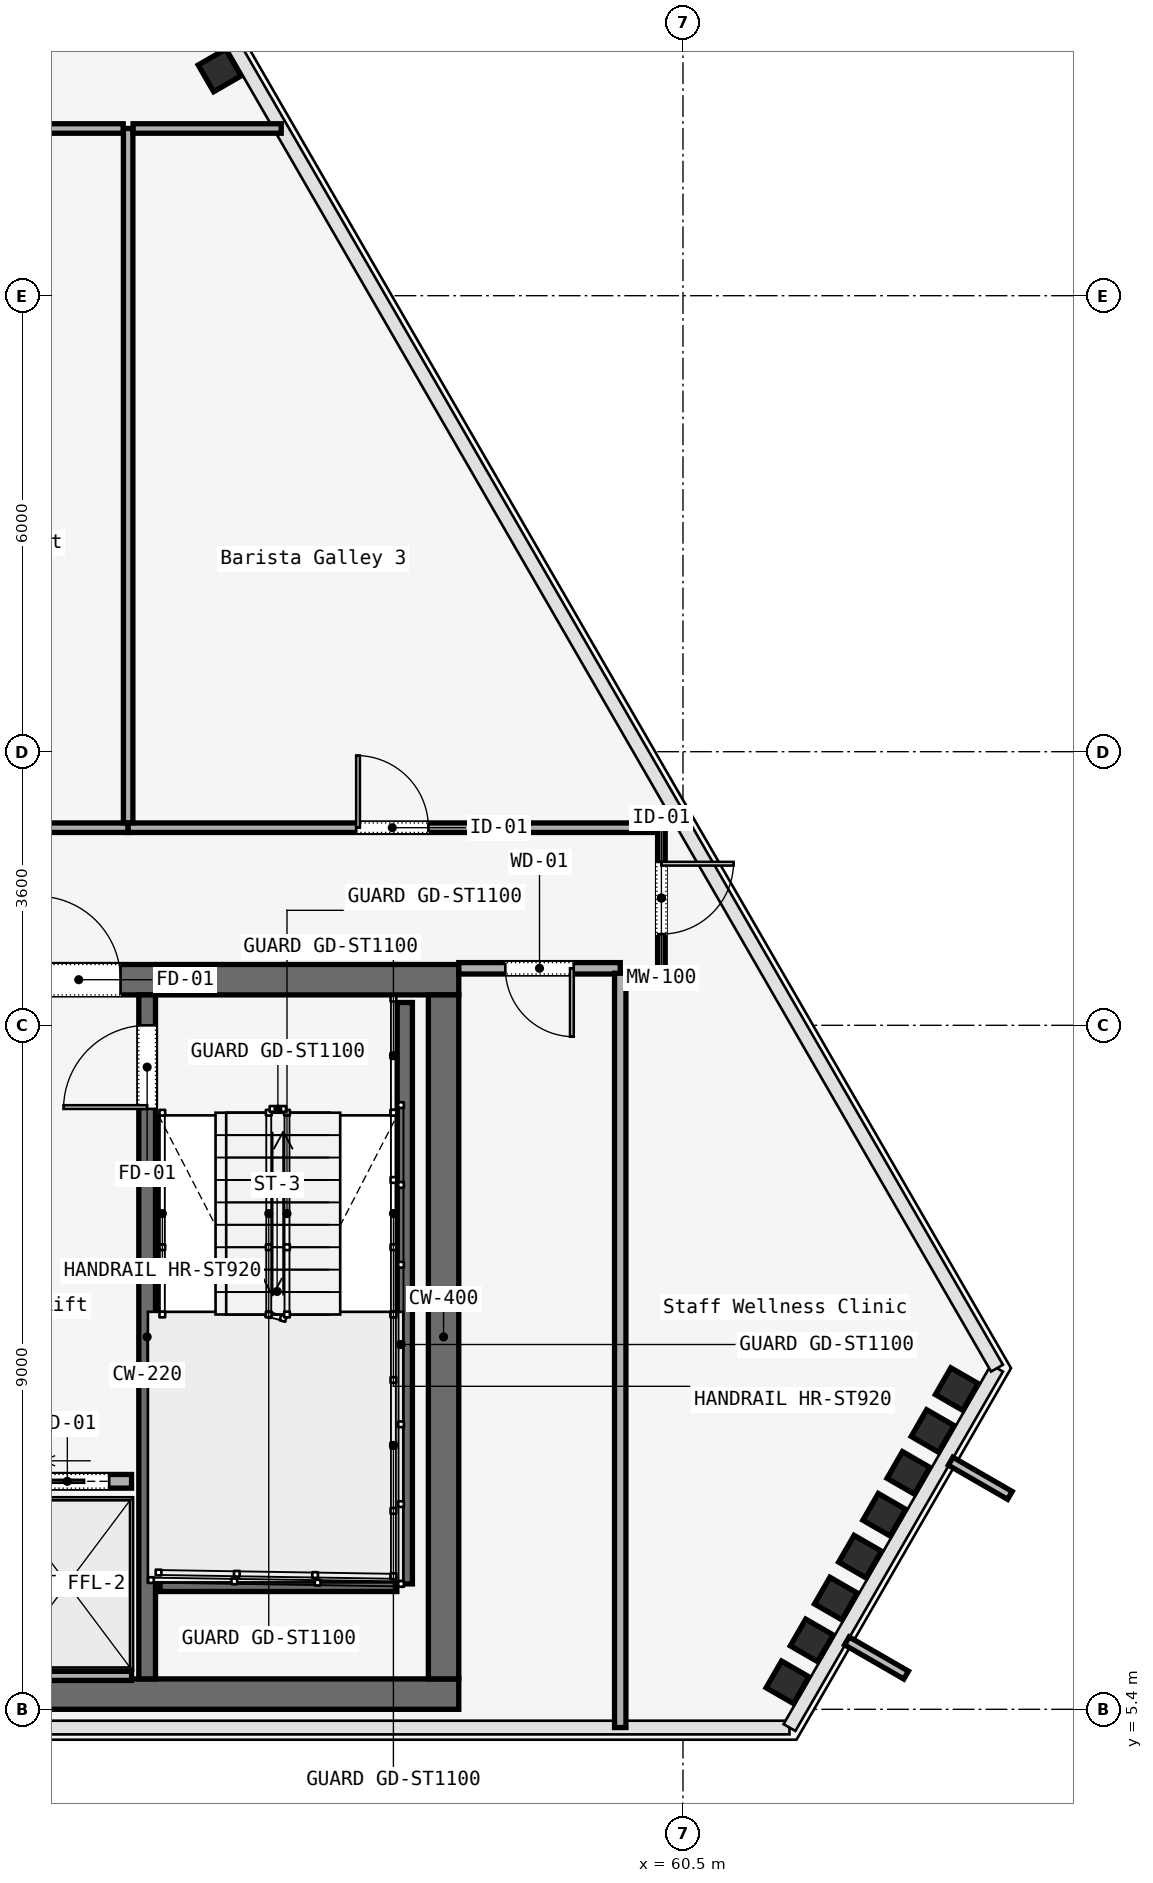
"""IFC4 building model, lengths in metres.
Left out: names, types, materials, properties, quantities, classifications, styles, units other than length and angle.
Written with IfcOpenShell. Run it as: python <this file> out.ifc"""

import sys

from ifc_helpers import new_model, si_unit, direction, frame, frame_2d, origin, origin_2d, place, context, subcontext, project, spatial, rectangle, i_section, extrude, element, fill, save


model = new_model("IFC4")
c1 = context("Model", 3, precision=1e-05, world=origin(), true_north=direction((0.0, 1.0)))
c2 = subcontext(c1, "Body", "Model", "MODEL_VIEW")
j1 = project(units=[si_unit("LENGTHUNIT", "METRE"), si_unit("PLANEANGLEUNIT", "RADIAN")], contexts=[c1])
p1 = place(None, origin())
s1 = spatial("IfcSite", under=j1, at=p1, CompositionType="ELEMENT")
p2 = place(p1, origin())
s2 = spatial("IfcBuilding", under=s1, at=p2, CompositionType="ELEMENT")
p3 = place(p2, frame((0.0, 0.0, 267.4)))
s3 = spatial("IfcBuildingStorey", under=s2, at=p3, CompositionType="ELEMENT", Elevation=267.4)
p4 = place(p3, frame((26.45, 15.0, 0.0), z_axis=(0.0, 0.0, 1.0), x_axis=(1.0, 0.0, 0.0)))
e1 = element("IfcWall", 1, at=p4, inside=s3, PredefinedType="SOLIDWALL", context=c2, shape_type="SweptSolid", body=[
    extrude(rectangle(XDim=31.1, YDim=0.4, at=frame_2d((15.55, 0.0))), origin(), (0.0, 0.0, 1.0), 3.58),
])
p5 = place(p4, frame((1.65, 0.0, 0.0)))
e2 = element("IfcOpeningElement", 2, at=p5, cuts=e1, PredefinedType="OPENING", context=c2, shape_type="SweptSolid", body=[
    extrude(rectangle(XDim=1.1, YDim=2.2, at=frame_2d((0.55, 1.1))), frame((0.0, 0.2, 0.0), z_axis=(0.0, -1.0, 0.0), x_axis=(1.0, 0.0, 0.0)), (0.0, 0.0, 1.0), 0.4),
])
p6 = place(p4, frame((13.65, 0.0, 0.0)))
e3 = element("IfcOpeningElement", 3, at=p6, cuts=e1, PredefinedType="OPENING", context=c2, shape_type="SweptSolid", body=[
    extrude(rectangle(XDim=1.1, YDim=2.2, at=frame_2d((0.55, 1.1))), frame((0.0, 0.2, 0.0), z_axis=(0.0, -1.0, 0.0), x_axis=(1.0, 0.0, 0.0)), (0.0, 0.0, 1.0), 0.4),
])
p7 = place(p4, frame((25.55, 0.0, 0.0)))
e4 = element("IfcOpeningElement", 4, at=p7, cuts=e1, PredefinedType="OPENING", context=c2, shape_type="SweptSolid", body=[
    extrude(rectangle(XDim=1.1, YDim=2.2, at=frame_2d((0.55, 1.1))), frame((0.0, 0.2, 0.0), z_axis=(0.0, -1.0, 0.0), x_axis=(1.0, 0.0, 0.0)), (0.0, 0.0, 1.0), 0.4),
])
p8 = place(p4, frame((19.35, 0.0, 0.0)))
e5 = element("IfcOpeningElement", 5, at=p8, cuts=e1, PredefinedType="OPENING", context=c2, shape_type="SweptSolid", body=[
    extrude(rectangle(XDim=1.1, YDim=2.2, at=frame_2d((0.55, 1.1))), frame((0.0, 0.2, 0.0), z_axis=(0.0, -1.0, 0.0), x_axis=(1.0, 0.0, 0.0)), (0.0, 0.0, 1.0), 0.4),
])
p9 = place(p4, frame((21.4, 0.0, 0.0)))
e6 = element("IfcOpeningElement", 6, at=p9, cuts=e1, PredefinedType="OPENING", context=c2, shape_type="SweptSolid", body=[
    extrude(rectangle(XDim=0.9, YDim=2.1, at=frame_2d((0.45, 1.05))), frame((0.0, 0.2, 0.0), z_axis=(0.0, -1.0, 0.0), x_axis=(1.0, 0.0, 0.0)), (0.0, 0.0, 1.0), 0.4),
])
p10 = place(p4, frame((6.54, 0.0, 0.0)))
e7 = element("IfcOpeningElement", 7, at=p10, cuts=e1, PredefinedType="OPENING", context=c2, shape_type="SweptSolid", body=[
    extrude(rectangle(XDim=0.95, YDim=2.2, at=frame_2d((0.475, 1.1))), frame((0.0, 0.2, 0.0), z_axis=(0.0, -1.0, 0.0), x_axis=(1.0, 0.0, 0.0)), (0.0, 0.0, 1.0), 0.4),
])
p11 = place(p4, frame((10.49, 0.0, 0.0)))
e8 = element("IfcOpeningElement", 8, at=p11, cuts=e1, PredefinedType="OPENING", context=c2, shape_type="SweptSolid", body=[
    extrude(rectangle(XDim=0.95, YDim=2.2, at=frame_2d((0.475, 1.1))), frame((0.0, 0.2, 0.0), z_axis=(0.0, -1.0, 0.0), x_axis=(1.0, 0.0, 0.0)), (0.0, 0.0, 1.0), 0.4),
])
p12 = place(p4, frame((23.35, 0.0, 0.0)))
e9 = element("IfcOpeningElement", 9, at=p12, cuts=e1, PredefinedType="OPENING", context=c2, shape_type="SweptSolid", body=[
    extrude(rectangle(XDim=1.3, YDim=2.3, at=frame_2d((0.65, 1.15))), frame((0.0, 0.2, 0.0), z_axis=(0.0, -1.0, 0.0), x_axis=(1.0, 0.0, 0.0)), (0.0, 0.0, 1.0), 0.4),
])
p13 = place(p3, frame((26.45, 5.6, 0.0), z_axis=(0.0, 0.0, 1.0), x_axis=(1.0, 0.0, 0.0)))
e10 = element("IfcWall", 10, at=p13, inside=s3, PredefinedType="SOLIDWALL", context=c2, shape_type="SweptSolid", body=[
    extrude(rectangle(XDim=31.1, YDim=0.4, at=frame_2d((15.55, 0.0))), origin(), (0.0, 0.0, 1.0), 3.58),
])
p14 = place(p3, frame((57.35, 5.8, 0.0), z_axis=(0.0, 0.0, 1.0), x_axis=(0.0, 1.0, 0.0)))
e11 = element("IfcWall", 11, at=p14, inside=s3, PredefinedType="SOLIDWALL", context=c2, shape_type="SweptSolid", body=[
    extrude(rectangle(XDim=9.0, YDim=0.4, at=frame_2d((4.5, 0.0))), origin(), (0.0, 0.0, 1.0), 3.58),
])
p15 = place(p3, frame((53.45, 5.8, 0.0), z_axis=(0.0, 0.0, 1.0), x_axis=(0.0, 1.0, 0.0)))
e12 = element("IfcWall", 12, at=p15, inside=s3, PredefinedType="SOLIDWALL", context=c2, shape_type="SweptSolid", body=[
    extrude(rectangle(XDim=9.0, YDim=0.22, at=frame_2d((4.5, 0.0))), origin(), (0.0, 0.0, 1.0), 3.58),
])
p16 = place(p15, frame((7.5, 0.0, 0.0)))
e13 = element("IfcOpeningElement", 13, at=p16, cuts=e12, PredefinedType="OPENING", context=c2, shape_type="SweptSolid", body=[
    extrude(rectangle(XDim=1.1, YDim=2.2, at=frame_2d((0.55, 1.1))), frame((0.0, 0.11, 0.0), z_axis=(0.0, -1.0, 0.0), x_axis=(1.0, 0.0, 0.0)), (0.0, 0.0, 1.0), 0.22),
])
p17 = place(p3, frame((61.875, 5.756, 0.0), z_axis=(0.012955611258, -0.005591369069, 0.999900439408), x_axis=(-0.596929933776, 0.802200299619, 0.012220206764)))
e14 = element("IfcColumn", 14, at=p17, inside=s3, PredefinedType="COLUMN", context=c2, shape_type="SweptSolid", body=[
    extrude(i_section(OverallWidth=0.406, OverallDepth=0.416, WebThickness=0.03, FlangeThickness=0.037, FilletRadius=0.015, at=origin_2d()), origin(), (0.0, 0.0, 1.0), 3.58),
])
p18 = place(p3, frame((62.194, 6.307, 0.0), z_axis=(0.006477395903, -0.016841229347, 0.999837194915), x_axis=(0.155838414652, 0.987658949623, 0.015626507854)))
e15 = element("IfcColumn", 15, at=p18, inside=s3, PredefinedType="COLUMN", context=c2, shape_type="SweptSolid", body=[
    extrude(i_section(OverallWidth=0.406, OverallDepth=0.416, WebThickness=0.03, FlangeThickness=0.037, FilletRadius=0.015, at=origin_2d()), origin(), (0.0, 0.0, 1.0), 3.581),
])
p19 = place(p3, frame((62.512, 6.858, 0.0), z_axis=(6.8167317e-05, -0.028084934649, 0.999605538099), x_axis=(0.497897359143, 0.866894828458, 0.024322338514)))
e16 = element("IfcColumn", 16, at=p19, inside=s3, PredefinedType="COLUMN", context=c2, shape_type="SweptSolid", body=[
    extrude(i_section(OverallWidth=0.406, OverallDepth=0.416, WebThickness=0.03, FlangeThickness=0.037, FilletRadius=0.015, at=origin_2d()), origin(), (0.0, 0.0, 1.0), 3.582),
])
p20 = place(p3, frame((62.83, 7.409, 0.0), z_axis=(-0.006405185512, -0.03924879633, 0.999208939905), x_axis=(0.632846982023, 0.773510553601, 0.034440104691)))
e17 = element("IfcColumn", 17, at=p20, inside=s3, PredefinedType="COLUMN", context=c2, shape_type="SweptSolid", body=[
    extrude(i_section(OverallWidth=0.406, OverallDepth=0.416, WebThickness=0.03, FlangeThickness=0.037, FilletRadius=0.015, at=origin_2d()), origin(), (0.0, 0.0, 1.0), 3.583),
])
p21 = place(p3, frame((63.148, 7.96, 0.0), z_axis=(-0.012939351426, -0.050395368712, 0.998645522694), x_axis=(0.699371889623, 0.71333626012, 0.045059294293)))
e18 = element("IfcColumn", 18, at=p21, inside=s3, PredefinedType="COLUMN", context=c2, shape_type="SweptSolid", body=[
    extrude(i_section(OverallWidth=0.406, OverallDepth=0.416, WebThickness=0.03, FlangeThickness=0.037, FilletRadius=0.015, at=origin_2d()), origin(), (0.0, 0.0, 1.0), 3.585),
])
p22 = place(p3, frame((63.466, 8.511, 0.0), z_axis=(-0.01932684997, -0.061519268919, 0.997918760432), x_axis=(0.736036278953, 0.674634705142, 0.055844522413)))
e19 = element("IfcColumn", 19, at=p22, inside=s3, PredefinedType="COLUMN", context=c2, shape_type="SweptSolid", body=[
    extrude(i_section(OverallWidth=0.406, OverallDepth=0.416, WebThickness=0.03, FlangeThickness=0.037, FilletRadius=0.015, at=origin_2d()), origin(), (0.0, 0.0, 1.0), 3.588),
])
p23 = place(p3, frame((63.784, 9.062, 0.0), z_axis=(-0.025768771988, -0.072614903648, 0.997027104024), x_axis=(0.759977664998, 0.646514681444, 0.066728669859)))
e20 = element("IfcColumn", 20, at=p23, inside=s3, PredefinedType="COLUMN", context=c2, shape_type="SweptSolid", body=[
    extrude(i_section(OverallWidth=0.406, OverallDepth=0.416, WebThickness=0.03, FlangeThickness=0.037, FilletRadius=0.015, at=origin_2d()), origin(), (0.0, 0.0, 1.0), 3.591),
])
p24 = place(p3, frame((64.103, 9.613, 0.0), z_axis=(-0.032193698933, -0.083744368744, 0.995967091049), x_axis=(0.776202026322, 0.62567823134, 0.077699196653)))
e21 = element("IfcColumn", 21, at=p24, inside=s3, PredefinedType="COLUMN", context=c2, shape_type="SweptSolid", body=[
    extrude(i_section(OverallWidth=0.406, OverallDepth=0.416, WebThickness=0.03, FlangeThickness=0.037, FilletRadius=0.015, at=origin_2d()), origin(), (0.0, 0.0, 1.0), 3.594),
])
p25 = place(p3, frame((54.404, 26.964, 0.0), z_axis=(-0.043478865164, -0.075340721042, 0.996209498066), x_axis=(-0.001831154603, 0.997156793037, 0.075332443026)))
e22 = element("IfcColumn", 22, at=p25, inside=s3, PredefinedType="COLUMN", context=c2, shape_type="SweptSolid", body=[
    extrude(i_section(OverallWidth=0.406, OverallDepth=0.416, WebThickness=0.03, FlangeThickness=0.037, FilletRadius=0.015, at=origin_2d()), origin(), (0.0, 0.0, 1.0), 3.594),
])
p26 = place(p3, frame((56.84, 14.7, 0.0), z_axis=(0.0, 0.0, 1.0), x_axis=(0.0, -1.0, 0.0)))
e23 = element("IfcWall", 23, at=p26, inside=s3, PredefinedType="SOLIDWALL", context=c2, shape_type="SweptSolid", body=[
    extrude(rectangle(XDim=7.65, YDim=0.2, at=frame_2d((3.825, 0.0))), origin(), (0.0, 0.0, 1.0), 3.8),
])
p27 = place(p3, frame((53.62, 7.05, 0.0), z_axis=(0.0, 0.0, 1.0), x_axis=(1.0, 0.0, 0.0)))
e24 = element("IfcWall", 24, at=p27, inside=s3, PredefinedType="SOLIDWALL", context=c2, shape_type="SweptSolid", body=[
    extrude(rectangle(XDim=3.115, YDim=0.2, at=frame_2d((1.558, 0.0))), origin(), (0.0, 0.0, 1.0), 3.8),
])
p28 = place(p3, frame((51.555, 8.4, 0.0), z_axis=(0.0, 0.0, 1.0), x_axis=(1.0, 0.0, 0.0)))
e25 = element("IfcWall", 25, at=p28, inside=s3, PredefinedType="SOLIDWALL", context=c2, shape_type="SweptSolid", body=[
    extrude(rectangle(XDim=1.69, YDim=0.18, at=frame_2d((0.845, 0.0))), origin(), (0.0, 0.0, 1.0), 3.01),
])
p29 = place(p28, frame((0.295, 0.0, 0.0)))
e26 = element("IfcOpeningElement", 26, at=p29, cuts=e25, PredefinedType="OPENING", context=c2, shape_type="SweptSolid", body=[
    extrude(rectangle(XDim=1.1, YDim=2.2, at=frame_2d((0.55, 1.1))), frame((0.0, 0.09, 0.0), z_axis=(0.0, -1.0, 0.0), x_axis=(1.0, 0.0, 0.0)), (0.0, 0.0, 1.0), 0.18),
])
p30 = place(p3, frame((51.555, 5.84, 0.0), z_axis=(0.0, 0.0, 1.0), x_axis=(1.0, 0.0, 0.0)))
e27 = element("IfcWall", 27, at=p30, inside=s3, PredefinedType="SOLIDWALL", context=c2, shape_type="SweptSolid", body=[
    extrude(rectangle(XDim=1.69, YDim=0.12, at=frame_2d((0.845, 0.0))), origin(), (0.0, 0.0, 1.0), 3.01),
])
p31 = place(p3, frame((60.216, 17.0, 0.0), z_axis=(0.0, 0.0, 1.0), x_axis=(0.0, -1.0, 0.0)))
e28 = element("IfcWall", 28, at=p31, inside=s3, PredefinedType="MOVABLE", context=c2, shape_type="SweptSolid", body=[
    extrude(rectangle(XDim=1.85, YDim=0.1, at=frame_2d((0.925, 0.0))), origin(), (0.0, 0.0, 1.0), 3.01),
])
p32 = place(p31, frame((0.45, 0.0, 0.0)))
e29 = element("IfcOpeningElement", 29, at=p32, cuts=e28, PredefinedType="OPENING", context=c2, shape_type="SweptSolid", body=[
    extrude(rectangle(XDim=0.95, YDim=2.2, at=frame_2d((0.475, 1.1))), frame((0.0, 0.05, 0.0), z_axis=(0.0, -1.0, 0.0), x_axis=(1.0, 0.0, 0.0)), (0.0, 0.0, 1.0), 0.1),
])
p33 = place(p3, frame((59.674, 15.15, 0.0), z_axis=(0.0, 0.0, 1.0), x_axis=(-1.0, 0.0, 0.0)))
e30 = element("IfcWall", 30, at=p33, inside=s3, PredefinedType="PARTITIONING", context=c2, shape_type="SweptSolid", body=[
    extrude(rectangle(XDim=2.124, YDim=0.15, at=frame_2d((1.062, 0.0))), origin(), (0.0, 0.0, 1.0), 3.01),
])
p34 = place(p33, frame((0.612, 0.0, 0.0)))
e31 = element("IfcOpeningElement", 31, at=p34, cuts=e30, PredefinedType="OPENING", context=c2, shape_type="SweptSolid", body=[
    extrude(rectangle(XDim=0.9, YDim=2.15, at=frame_2d((0.45, 1.075))), frame((0.0, 0.075, 0.0), z_axis=(0.0, -1.0, 0.0), x_axis=(1.0, 0.0, 0.0)), (0.0, 0.0, 1.0), 0.15),
])
p35 = place(p3, frame((48.4, 17.0, 0.0), z_axis=(0.0, 0.0, 1.0), x_axis=(1.0, 0.0, 0.0)))
e32 = element("IfcWall", 32, at=p35, inside=s3, PredefinedType="PARTITIONING", context=c2, shape_type="SweptSolid", body=[
    extrude(rectangle(XDim=4.8, YDim=0.125, at=frame_2d((2.4, 0.0))), origin(), (0.0, 0.0, 1.0), 3.01),
])
p36 = place(p35, frame((1.925, 0.0, 0.0)))
e33 = element("IfcOpeningElement", 33, at=p36, cuts=e32, PredefinedType="OPENING", context=c2, shape_type="SweptSolid", body=[
    extrude(rectangle(XDim=0.95, YDim=2.2, at=frame_2d((0.475, 1.1))), frame((0.0, 0.062, 0.0), z_axis=(0.0, -1.0, 0.0), x_axis=(1.0, 0.0, 0.0)), (0.0, 0.0, 1.0), 0.125),
])
p37 = place(p3, frame((53.2, 17.0, 0.0), z_axis=(0.0, 0.0, 1.0), x_axis=(1.0, 0.0, 0.0)))
e34 = element("IfcWall", 34, at=p37, inside=s3, PredefinedType="PARTITIONING", context=c2, shape_type="SweptSolid", body=[
    extrude(rectangle(XDim=6.951, YDim=0.125, at=frame_2d((3.476, 0.0))), origin(), (0.0, 0.0, 1.0), 3.01),
])
p38 = place(p37, frame((3.0, 0.0, 0.0)))
e35 = element("IfcOpeningElement", 35, at=p38, cuts=e34, PredefinedType="OPENING", context=c2, shape_type="SweptSolid", body=[
    extrude(rectangle(XDim=0.95, YDim=2.2, at=frame_2d((0.475, 1.1))), frame((0.0, 0.062, 0.0), z_axis=(0.0, -1.0, 0.0), x_axis=(1.0, 0.0, 0.0)), (0.0, 0.0, 1.0), 0.125),
])
p39 = place(p3, frame((59.674, 15.085, 0.0), z_axis=(0.0, 0.0, 1.0), x_axis=(0.0, -1.0, 0.0)))
e36 = element("IfcWall", 36, at=p39, inside=s3, PredefinedType="PARTITIONING", context=c2, shape_type="SweptSolid", body=[
    extrude(rectangle(XDim=9.925, YDim=0.15, at=frame_2d((4.962, 0.0))), origin(), (0.0, 0.0, 1.0), 3.01),
])
p40 = place(p3, frame((53.2, 17.065, 0.0), z_axis=(0.0, 0.0, 1.0), x_axis=(0.0, 1.0, 0.0)))
e37 = element("IfcWall", 37, at=p40, inside=s3, PredefinedType="PARTITIONING", context=c2, shape_type="SweptSolid", body=[
    extrude(rectangle(XDim=9.135, YDim=0.125, at=frame_2d((4.567, 0.0))), origin(), (0.0, 0.0, 1.0), 3.01),
])
p41 = place(p3, frame((53.265, 26.2, 0.0), z_axis=(0.0, 0.0, 1.0), x_axis=(1.0, 0.0, 0.0)))
e38 = element("IfcWall", 38, at=p41, inside=s3, PredefinedType="PARTITIONING", context=c2, shape_type="SweptSolid", body=[
    extrude(rectangle(XDim=1.949, YDim=0.125, at=frame_2d((0.975, 0.0))), origin(), (0.0, 0.0, 1.0), 3.01),
])
p42 = place(p3, frame((48.5, 26.2, 0.0), z_axis=(0.0, 0.0, 1.0), x_axis=(1.0, 0.0, 0.0)))
e39 = element("IfcWall", 39, at=p42, inside=s3, PredefinedType="PARTITIONING", context=c2, shape_type="SweptSolid", body=[
    extrude(rectangle(XDim=4.635, YDim=0.125, at=frame_2d((2.317, 0.0))), origin(), (0.0, 0.0, 1.0), 3.01),
])
p43 = place(p7, origin())
e40 = element("IfcDoor", 40, at=p43, inside=s3, OperationType="SINGLE_SWING_RIGHT", PredefinedType="DOOR", context=c2, shape_type="SweptSolid", body=[
    extrude(rectangle(XDim=1.1, YDim=2.2, at=frame_2d((0.55, 1.1))), frame((0.0, 0.025, 0.0), z_axis=(0.0, -1.0, 0.0), x_axis=(1.0, 0.0, 0.0)), (0.0, 0.0, 1.0), 0.05),
])
fill(e4, e40)
p44 = place(p16, origin())
e41 = element("IfcDoor", 41, at=p44, inside=s3, OperationType="SINGLE_SWING_LEFT", PredefinedType="DOOR", context=c2, shape_type="SweptSolid", body=[
    extrude(rectangle(XDim=1.1, YDim=2.2, at=frame_2d((0.55, 1.1))), frame((0.0, 0.025, 0.0), z_axis=(0.0, -1.0, 0.0), x_axis=(1.0, 0.0, 0.0)), (0.0, 0.0, 1.0), 0.05),
])
fill(e13, e41)
p45 = place(p29, origin())
e42 = element("IfcDoor", 42, at=p45, inside=s3, OperationType="SLIDING_TO_LEFT", PredefinedType="DOOR", context=c2, shape_type="SweptSolid", body=[
    extrude(rectangle(XDim=1.1, YDim=2.2, at=frame_2d((0.55, 1.1))), frame((0.0, 0.025, 0.0), z_axis=(0.0, -1.0, 0.0), x_axis=(1.0, 0.0, 0.0)), (0.0, 0.0, 1.0), 0.05),
])
fill(e26, e42)
p46 = place(p34, origin())
e43 = element("IfcDoor", 43, at=p46, inside=s3, OperationType="SINGLE_SWING_RIGHT", PredefinedType="DOOR", context=c2, shape_type="SweptSolid", body=[
    extrude(rectangle(XDim=0.9, YDim=2.15, at=frame_2d((0.45, 1.075))), frame((0.0, 0.025, 0.0), z_axis=(0.0, -1.0, 0.0), x_axis=(1.0, 0.0, 0.0)), (0.0, 0.0, 1.0), 0.05),
])
fill(e31, e43)
p47 = place(p32, origin())
e44 = element("IfcDoor", 44, at=p47, inside=s3, OperationType="SINGLE_SWING_RIGHT", PredefinedType="DOOR", context=c2, shape_type="SweptSolid", body=[
    extrude(rectangle(XDim=0.95, YDim=2.2, at=frame_2d((0.475, 1.1))), frame((0.0, 0.025, 0.0), z_axis=(0.0, -1.0, 0.0), x_axis=(1.0, 0.0, 0.0)), (0.0, 0.0, 1.0), 0.05),
])
fill(e29, e44)
p48 = place(p38, origin())
e45 = element("IfcDoor", 45, at=p48, inside=s3, OperationType="SINGLE_SWING_LEFT", PredefinedType="DOOR", context=c2, shape_type="SweptSolid", body=[
    extrude(rectangle(XDim=0.95, YDim=2.2, at=frame_2d((0.475, 1.1))), frame((0.0, 0.025, 0.0), z_axis=(0.0, -1.0, 0.0), x_axis=(1.0, 0.0, 0.0)), (0.0, 0.0, 1.0), 0.05),
])
fill(e35, e45)
save(model, sys.argv[1])
